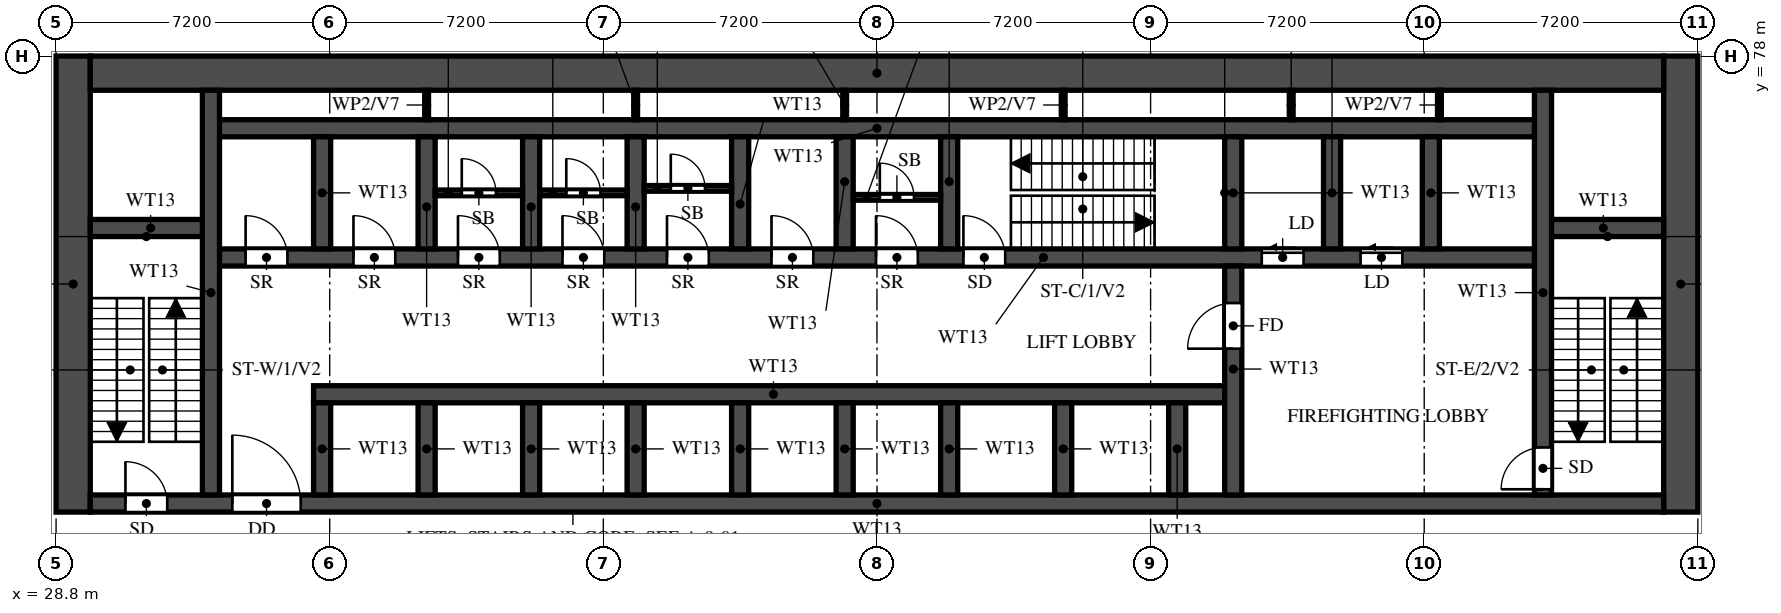
"""IFC4 building model, lengths in metres.
Left out: names, types, materials, properties, quantities, classifications, styles, units other than length and angle.
Written with IfcOpenShell. Run it as: python <this file> out.ifc"""

import sys

from ifc_helpers import new_model, si_unit, direction, frame, frame_2d, origin, place, context, subcontext, project, spatial, rectangle, extrude, element, fill, save


model = new_model("IFC4")
c1 = context("Model", 3, precision=1e-05, world=origin(), true_north=direction((0.0, 1.0)))
c2 = subcontext(c1, "Body", "Model", "MODEL_VIEW")
j1 = project(units=[si_unit("LENGTHUNIT", "METRE"), si_unit("PLANEANGLEUNIT", "RADIAN")], contexts=[c1])
p1 = place(None, origin())
s1 = spatial("IfcSite", under=j1, at=p1, CompositionType="ELEMENT")
p2 = place(p1, origin())
s2 = spatial("IfcBuilding", under=s1, at=p2, CompositionType="ELEMENT")
p3 = place(p2, frame((0.0, 0.0, -5.4)))
s3 = spatial("IfcBuildingStorey", under=s2, at=p3, CompositionType="ELEMENT", Elevation=-5.4)
for number, where, z_axis, x_axis in (
    (1, (29.25, 66.0, 0.0), (0.0, 0.0, 1.0), (0.0, 1.0, 0.0)),
    (2, (71.55, 66.0, 0.0), (0.0, 0.0, 1.0), (0.0, 1.0, 0.0)),
):
    element("IfcWall", number, at=place(p3, frame(where, z_axis=z_axis, x_axis=x_axis)), inside=s3, PredefinedType="SHEAR", context=c2, shape_type="SweptSolid", body=[
        extrude(rectangle(XDim=12.0, YDim=0.9, at=frame_2d((6.0, 0.0))), origin(), (0.0, 0.0, 1.0), 5.0),
    ])
p4 = place(p3, frame((29.7, 77.55, 0.0), z_axis=(0.0, 0.0, 1.0), x_axis=(1.0, 0.0, 0.0)))
e3 = element("IfcWall", 3, at=p4, inside=s3, PredefinedType="SHEAR", context=c2, shape_type="SweptSolid", body=[
    extrude(rectangle(XDim=41.4, YDim=0.9, at=frame_2d((20.7, 0.0))), origin(), (0.0, 0.0, 1.0), 5.0),
])
p5 = place(p3, frame((29.7, 66.225, 0.0), z_axis=(0.0, 0.0, 1.0), x_axis=(1.0, 0.0, 0.0)))
e4 = element("IfcWall", 4, at=p5, inside=s3, PredefinedType="SHEAR", context=c2, shape_type="SweptSolid", body=[
    extrude(rectangle(XDim=41.4, YDim=0.45, at=frame_2d((20.7, 0.0))), origin(), (0.0, 0.0, 1.0), 5.0),
])
p6 = place(p5, frame((0.925, 0.0, 0.0)))
e5 = element("IfcOpeningElement", 5, at=p6, cuts=e4, PredefinedType="OPENING", context=c2, shape_type="SweptSolid", body=[
    extrude(rectangle(XDim=1.1, YDim=2.1, at=frame_2d((0.55, 1.05))), frame((0.0, 0.235, 0.0), z_axis=(0.0, -1.0, 0.0), x_axis=(1.0, 0.0, 0.0)), (0.0, 0.0, 1.0), 0.47),
])
p7 = place(p5, frame((3.738, 0.0, 0.0)))
e6 = element("IfcOpeningElement", 6, at=p7, cuts=e4, PredefinedType="OPENING", context=c2, shape_type="SweptSolid", body=[
    extrude(rectangle(XDim=1.8, YDim=2.1, at=frame_2d((0.9, 1.05))), frame((0.0, 0.235, 0.0), z_axis=(0.0, -1.0, 0.0), x_axis=(1.0, 0.0, 0.0)), (0.0, 0.0, 1.0), 0.47),
])
p8 = place(p3, frame((35.575, 69.1, 0.0), z_axis=(0.0, 0.0, 1.0), x_axis=(1.0, 0.0, 0.0)))
e7 = element("IfcWall", 7, at=p8, inside=s3, PredefinedType="SHEAR", context=c2, shape_type="SweptSolid", body=[
    extrude(rectangle(XDim=24.2, YDim=0.45, at=frame_2d((12.1, 0.0))), origin(), (0.0, 0.0, 1.0), 5.0),
])
p9 = place(p3, frame((32.875, 72.7, 0.0), z_axis=(0.0, 0.0, 1.0), x_axis=(1.0, 0.0, 0.0)))
e8 = element("IfcWall", 8, at=p9, inside=s3, PredefinedType="SHEAR", context=c2, shape_type="SweptSolid", body=[
    extrude(rectangle(XDim=35.05, YDim=0.45, at=frame_2d((17.525, 0.0))), origin(), (0.0, 0.0, 1.0), 5.0),
])
p10 = place(p9, frame((19.8, 0.0, 0.0)))
e9 = element("IfcOpeningElement", 9, at=p10, cuts=e8, PredefinedType="OPENING", context=c2, shape_type="SweptSolid", body=[
    extrude(rectangle(XDim=1.1, YDim=2.1, at=frame_2d((0.55, 1.05))), frame((0.0, 0.235, 0.0), z_axis=(0.0, -1.0, 0.0), x_axis=(1.0, 0.0, 0.0)), (0.0, 0.0, 1.0), 0.47),
])
p11 = place(p9, frame((27.65, 0.0, 0.0)))
e10 = element("IfcOpeningElement", 10, at=p11, cuts=e8, PredefinedType="OPENING", context=c2, shape_type="SweptSolid", body=[
    extrude(rectangle(XDim=1.1, YDim=2.1, at=frame_2d((0.55, 1.05))), frame((0.0, 0.235, 0.0), z_axis=(0.0, -1.0, 0.0), x_axis=(1.0, 0.0, 0.0)), (0.0, 0.0, 1.0), 0.47),
])
p12 = place(p9, frame((30.25, 0.0, 0.0)))
e11 = element("IfcOpeningElement", 11, at=p12, cuts=e8, PredefinedType="OPENING", context=c2, shape_type="SweptSolid", body=[
    extrude(rectangle(XDim=1.1, YDim=2.1, at=frame_2d((0.55, 1.05))), frame((0.0, 0.235, 0.0), z_axis=(0.0, -1.0, 0.0), x_axis=(1.0, 0.0, 0.0)), (0.0, 0.0, 1.0), 0.47),
])
p13 = place(p9, frame((3.75, 0.0, 0.0)))
e12 = element("IfcOpeningElement", 12, at=p13, cuts=e8, PredefinedType="OPENING", context=c2, shape_type="SweptSolid", body=[
    extrude(rectangle(XDim=1.1, YDim=2.1, at=frame_2d((0.55, 1.05))), frame((0.0, 0.235, 0.0), z_axis=(0.0, -1.0, 0.0), x_axis=(1.0, 0.0, 0.0)), (0.0, 0.0, 1.0), 0.47),
])
p14 = place(p9, frame((6.5, 0.0, 0.0)))
e13 = element("IfcOpeningElement", 13, at=p14, cuts=e8, PredefinedType="OPENING", context=c2, shape_type="SweptSolid", body=[
    extrude(rectangle(XDim=1.1, YDim=2.1, at=frame_2d((0.55, 1.05))), frame((0.0, 0.235, 0.0), z_axis=(0.0, -1.0, 0.0), x_axis=(1.0, 0.0, 0.0)), (0.0, 0.0, 1.0), 0.47),
])
p15 = place(p9, frame((9.25, 0.0, 0.0)))
e14 = element("IfcOpeningElement", 14, at=p15, cuts=e8, PredefinedType="OPENING", context=c2, shape_type="SweptSolid", body=[
    extrude(rectangle(XDim=1.1, YDim=2.1, at=frame_2d((0.55, 1.05))), frame((0.0, 0.235, 0.0), z_axis=(0.0, -1.0, 0.0), x_axis=(1.0, 0.0, 0.0)), (0.0, 0.0, 1.0), 0.47),
])
p16 = place(p9, frame((12.0, 0.0, 0.0)))
e15 = element("IfcOpeningElement", 15, at=p16, cuts=e8, PredefinedType="OPENING", context=c2, shape_type="SweptSolid", body=[
    extrude(rectangle(XDim=1.1, YDim=2.1, at=frame_2d((0.55, 1.05))), frame((0.0, 0.235, 0.0), z_axis=(0.0, -1.0, 0.0), x_axis=(1.0, 0.0, 0.0)), (0.0, 0.0, 1.0), 0.47),
])
p17 = place(p9, frame((14.75, 0.0, 0.0)))
e16 = element("IfcOpeningElement", 16, at=p17, cuts=e8, PredefinedType="OPENING", context=c2, shape_type="SweptSolid", body=[
    extrude(rectangle(XDim=1.1, YDim=2.1, at=frame_2d((0.55, 1.05))), frame((0.0, 0.235, 0.0), z_axis=(0.0, -1.0, 0.0), x_axis=(1.0, 0.0, 0.0)), (0.0, 0.0, 1.0), 0.47),
])
p18 = place(p9, frame((17.5, 0.0, 0.0)))
e17 = element("IfcOpeningElement", 17, at=p18, cuts=e8, PredefinedType="OPENING", context=c2, shape_type="SweptSolid", body=[
    extrude(rectangle(XDim=1.1, YDim=2.1, at=frame_2d((0.55, 1.05))), frame((0.0, 0.235, 0.0), z_axis=(0.0, -1.0, 0.0), x_axis=(1.0, 0.0, 0.0)), (0.0, 0.0, 1.0), 0.47),
])
p19 = place(p9, frame((0.913, 0.0, 0.0)))
e18 = element("IfcOpeningElement", 18, at=p19, cuts=e8, PredefinedType="OPENING", context=c2, shape_type="SweptSolid", body=[
    extrude(rectangle(XDim=1.1, YDim=2.1, at=frame_2d((0.55, 1.05))), frame((0.0, 0.235, 0.0), z_axis=(0.0, -1.0, 0.0), x_axis=(1.0, 0.0, 0.0)), (0.0, 0.0, 1.0), 0.47),
])
p20 = place(p3, frame((32.875, 76.1, 0.0), z_axis=(0.0, 0.0, 1.0), x_axis=(1.0, 0.0, 0.0)))
e19 = element("IfcWall", 19, at=p20, inside=s3, PredefinedType="SHEAR", context=c2, shape_type="SweptSolid", body=[
    extrude(rectangle(XDim=35.05, YDim=0.45, at=frame_2d((17.525, 0.0))), origin(), (0.0, 0.0, 1.0), 5.0),
])
for number, where, z_axis, x_axis in (
    (20, (29.7, 73.475, 0.0), (0.0, 0.0, 1.0), (1.0, 0.0, 0.0)),
    (21, (67.925, 73.475, 0.0), (0.0, 0.0, 1.0), (1.0, 0.0, 0.0)),
):
    element("IfcWall", number, at=place(p3, frame(where, z_axis=z_axis, x_axis=x_axis)), inside=s3, PredefinedType="SHEAR", context=c2, shape_type="SweptSolid", body=[
        extrude(rectangle(XDim=3.175, YDim=0.45, at=frame_2d((1.587, 0.0))), origin(), (0.0, 0.0, 1.0), 5.0),
    ])
p21 = place(p3, frame((32.875, 66.45, 0.0), z_axis=(0.0, 0.0, 1.0), x_axis=(0.0, 1.0, 0.0)))
e22 = element("IfcWall", 22, at=p21, inside=s3, PredefinedType="SHEAR", context=c2, shape_type="SweptSolid", body=[
    extrude(rectangle(XDim=10.65, YDim=0.45, at=frame_2d((5.325, 0.0))), origin(), (0.0, 0.0, 1.0), 5.0),
])
p22 = place(p3, frame((67.925, 66.45, 0.0), z_axis=(0.0, 0.0, 1.0), x_axis=(0.0, 1.0, 0.0)))
e23 = element("IfcWall", 23, at=p22, inside=s3, PredefinedType="SHEAR", context=c2, shape_type="SweptSolid", body=[
    extrude(rectangle(XDim=10.65, YDim=0.45, at=frame_2d((5.325, 0.0))), origin(), (0.0, 0.0, 1.0), 5.0),
])
p23 = place(p22, frame((0.15, 0.0, 0.0)))
e24 = element("IfcOpeningElement", 24, at=p23, cuts=e23, PredefinedType="OPENING", context=c2, shape_type="SweptSolid", body=[
    extrude(rectangle(XDim=1.1, YDim=2.1, at=frame_2d((0.55, 1.05))), frame((0.0, 0.235, 0.0), z_axis=(0.0, -1.0, 0.0), x_axis=(1.0, 0.0, 0.0)), (0.0, 0.0, 1.0), 0.47),
])
p24 = place(p3, frame((59.775, 66.45, 0.0), z_axis=(0.0, 0.0, 1.0), x_axis=(0.0, 1.0, 0.0)))
e25 = element("IfcWall", 25, at=p24, inside=s3, PredefinedType="SHEAR", context=c2, shape_type="SweptSolid", body=[
    extrude(rectangle(XDim=6.025, YDim=0.45, at=frame_2d((3.013, 0.0))), origin(), (0.0, 0.0, 1.0), 5.0),
])
p25 = place(p24, frame((3.85, 0.0, 0.0)))
e26 = element("IfcOpeningElement", 26, at=p25, cuts=e25, PredefinedType="OPENING", context=c2, shape_type="SweptSolid", body=[
    extrude(rectangle(XDim=1.2, YDim=2.1, at=frame_2d((0.6, 1.05))), frame((0.0, 0.235, 0.0), z_axis=(0.0, -1.0, 0.0), x_axis=(1.0, 0.0, 0.0)), (0.0, 0.0, 1.0), 0.47),
])
p26 = place(p3, frame((59.775, 72.925, 0.0), z_axis=(0.0, 0.0, 1.0), x_axis=(0.0, 1.0, 0.0)))
e27 = element("IfcWall", 27, at=p26, inside=s3, PredefinedType="SHEAR", context=c2, shape_type="SweptSolid", body=[
    extrude(rectangle(XDim=2.95, YDim=0.45, at=frame_2d((1.475, 0.0))), origin(), (0.0, 0.0, 1.0), 5.0),
])
for number, where, z_axis, x_axis in (
    (28, (35.8, 66.45, 0.0), (0.0, 0.0, 1.0), (0.0, 1.0, 0.0)),
    (29, (38.55, 66.45, 0.0), (0.0, 0.0, 1.0), (0.0, 1.0, 0.0)),
    (30, (41.3, 66.45, 0.0), (0.0, 0.0, 1.0), (0.0, 1.0, 0.0)),
    (31, (44.05, 66.45, 0.0), (0.0, 0.0, 1.0), (0.0, 1.0, 0.0)),
    (32, (46.8, 66.45, 0.0), (0.0, 0.0, 1.0), (0.0, 1.0, 0.0)),
    (33, (49.55, 66.45, 0.0), (0.0, 0.0, 1.0), (0.0, 1.0, 0.0)),
    (34, (52.3, 66.45, 0.0), (0.0, 0.0, 1.0), (0.0, 1.0, 0.0)),
    (35, (55.3, 66.45, 0.0), (0.0, 0.0, 1.0), (0.0, 1.0, 0.0)),
    (36, (58.3, 66.45, 0.0), (0.0, 0.0, 1.0), (0.0, 1.0, 0.0)),
):
    element("IfcWall", number, at=place(p3, frame(where, z_axis=z_axis, x_axis=x_axis)), inside=s3, PredefinedType="SHEAR", context=c2, shape_type="SweptSolid", body=[
        extrude(rectangle(XDim=2.425, YDim=0.45, at=frame_2d((1.212, 0.0))), origin(), (0.0, 0.0, 1.0), 5.0),
    ])
for number, where, z_axis, x_axis in (
    (37, (35.8, 72.925, 0.0), (0.0, 0.0, 1.0), (0.0, 1.0, 0.0)),
    (38, (38.55, 72.925, 0.0), (0.0, 0.0, 1.0), (0.0, 1.0, 0.0)),
    (39, (41.3, 72.925, 0.0), (0.0, 0.0, 1.0), (0.0, 1.0, 0.0)),
    (40, (44.05, 72.925, 0.0), (0.0, 0.0, 1.0), (0.0, 1.0, 0.0)),
    (41, (46.8, 72.925, 0.0), (0.0, 0.0, 1.0), (0.0, 1.0, 0.0)),
    (42, (49.55, 72.925, 0.0), (0.0, 0.0, 1.0), (0.0, 1.0, 0.0)),
    (43, (52.3, 72.925, 0.0), (0.0, 0.0, 1.0), (0.0, 1.0, 0.0)),
    (44, (62.375, 72.925, 0.0), (0.0, 0.0, 1.0), (0.0, 1.0, 0.0)),
    (45, (64.975, 72.925, 0.0), (0.0, 0.0, 1.0), (0.0, 1.0, 0.0)),
):
    element("IfcWall", number, at=place(p3, frame(where, z_axis=z_axis, x_axis=x_axis)), inside=s3, PredefinedType="SHEAR", context=c2, shape_type="SweptSolid", body=[
        extrude(rectangle(XDim=2.95, YDim=0.45, at=frame_2d((1.475, 0.0))), origin(), (0.0, 0.0, 1.0), 5.0),
    ])
p27 = place(p3, frame((38.775, 74.4, 0.0), z_axis=(0.0, 0.0, 1.0), x_axis=(1.0, 0.0, 0.0)))
e46 = element("IfcWall", 46, at=p27, inside=s3, PredefinedType="PARTITIONING", context=c2, shape_type="SweptSolid", body=[
    extrude(rectangle(XDim=2.3, YDim=0.15, at=frame_2d((1.15, 0.0))), origin(), (0.0, 0.0, 1.0), 5.0),
])
p28 = place(p27, frame((0.7, 0.0, 0.0)))
e47 = element("IfcOpeningElement", 47, at=p28, cuts=e46, PredefinedType="OPENING", context=c2, shape_type="SweptSolid", body=[
    extrude(rectangle(XDim=0.9, YDim=2.1, at=frame_2d((0.45, 1.05))), frame((0.0, 0.085, 0.0), z_axis=(0.0, -1.0, 0.0), x_axis=(1.0, 0.0, 0.0)), (0.0, 0.0, 1.0), 0.17),
])
p29 = place(p3, frame((41.525, 74.4, 0.0), z_axis=(0.0, 0.0, 1.0), x_axis=(1.0, 0.0, 0.0)))
e48 = element("IfcWall", 48, at=p29, inside=s3, PredefinedType="PARTITIONING", context=c2, shape_type="SweptSolid", body=[
    extrude(rectangle(XDim=2.3, YDim=0.15, at=frame_2d((1.15, 0.0))), origin(), (0.0, 0.0, 1.0), 5.0),
])
p30 = place(p29, frame((0.7, 0.0, 0.0)))
e49 = element("IfcOpeningElement", 49, at=p30, cuts=e48, PredefinedType="OPENING", context=c2, shape_type="SweptSolid", body=[
    extrude(rectangle(XDim=0.9, YDim=2.1, at=frame_2d((0.45, 1.05))), frame((0.0, 0.085, 0.0), z_axis=(0.0, -1.0, 0.0), x_axis=(1.0, 0.0, 0.0)), (0.0, 0.0, 1.0), 0.17),
])
p31 = place(p3, frame((44.275, 74.518, 0.0), z_axis=(0.0, 0.0, 1.0), x_axis=(1.0, 0.0, 0.0)))
e50 = element("IfcWall", 50, at=p31, inside=s3, PredefinedType="PARTITIONING", context=c2, shape_type="SweptSolid", body=[
    extrude(rectangle(XDim=2.3, YDim=0.15, at=frame_2d((1.15, 0.0))), origin(), (0.0, 0.0, 1.0), 5.0),
])
p32 = place(p31, frame((0.7, 0.0, 0.0)))
e51 = element("IfcOpeningElement", 51, at=p32, cuts=e50, PredefinedType="OPENING", context=c2, shape_type="SweptSolid", body=[
    extrude(rectangle(XDim=0.9, YDim=2.1, at=frame_2d((0.45, 1.05))), frame((0.0, 0.085, 0.0), z_axis=(0.0, -1.0, 0.0), x_axis=(1.0, 0.0, 0.0)), (0.0, 0.0, 1.0), 0.17),
])
p33 = place(p3, frame((49.775, 74.282, 0.0), z_axis=(0.0, 0.0, 1.0), x_axis=(1.0, 0.0, 0.0)))
e52 = element("IfcWall", 52, at=p33, inside=s3, PredefinedType="PARTITIONING", context=c2, shape_type="SweptSolid", body=[
    extrude(rectangle(XDim=2.3, YDim=0.15, at=frame_2d((1.15, 0.0))), origin(), (0.0, 0.0, 1.0), 5.0),
])
p34 = place(p33, frame((0.7, 0.0, 0.0)))
e53 = element("IfcOpeningElement", 53, at=p34, cuts=e52, PredefinedType="OPENING", context=c2, shape_type="SweptSolid", body=[
    extrude(rectangle(XDim=0.9, YDim=2.1, at=frame_2d((0.45, 1.05))), frame((0.0, 0.085, 0.0), z_axis=(0.0, -1.0, 0.0), x_axis=(1.0, 0.0, 0.0)), (0.0, 0.0, 1.0), 0.17),
])
for number, where, z_axis, x_axis in (
    (54, (38.55, 76.325, 0.0), (0.0, 0.0, 1.0), (0.0, 1.0, 0.0)),
    (55, (44.05, 76.325, 0.0), (0.0, 0.0, 1.0), (0.0, 1.0, 0.0)),
    (56, (49.55, 76.325, 0.0), (0.0, 0.0, 1.0), (0.0, 1.0, 0.0)),
    (57, (55.3, 76.325, 0.0), (0.0, 0.0, 1.0), (0.0, 1.0, 0.0)),
    (58, (61.3, 76.325, 0.0), (0.0, 0.0, 1.0), (0.0, 1.0, 0.0)),
    (59, (65.2, 76.325, 0.0), (0.0, 0.0, 1.0), (0.0, 1.0, 0.0)),
):
    element("IfcWall", number, at=place(p3, frame(where, z_axis=z_axis, x_axis=x_axis)), inside=s3, PredefinedType="PARTITIONING", context=c2, shape_type="SweptSolid", body=[
        extrude(rectangle(XDim=0.775, YDim=0.1, at=frame_2d((0.388, 0.0))), origin(), (0.0, 0.0, 1.0), 5.0),
    ])
p35 = place(p6, origin())
e60 = element("IfcDoor", 60, at=p35, inside=s3, OperationType="SINGLE_SWING_LEFT", PredefinedType="DOOR", context=c2, shape_type="SweptSolid", body=[
    extrude(rectangle(XDim=1.1, YDim=2.1, at=frame_2d((0.55, 1.05))), frame((0.0, 0.025, 0.0), z_axis=(0.0, -1.0, 0.0), x_axis=(1.0, 0.0, 0.0)), (0.0, 0.0, 1.0), 0.05),
])
fill(e5, e60)
p36 = place(p10, origin())
e61 = element("IfcDoor", 61, at=p36, inside=s3, OperationType="SINGLE_SWING_LEFT", PredefinedType="DOOR", context=c2, shape_type="SweptSolid", body=[
    extrude(rectangle(XDim=1.1, YDim=2.1, at=frame_2d((0.55, 1.05))), frame((0.0, 0.025, 0.0), z_axis=(0.0, -1.0, 0.0), x_axis=(1.0, 0.0, 0.0)), (0.0, 0.0, 1.0), 0.05),
])
fill(e9, e61)
p37 = place(p23, origin())
e62 = element("IfcDoor", 62, at=p37, inside=s3, OperationType="SINGLE_SWING_LEFT", PredefinedType="DOOR", context=c2, shape_type="SweptSolid", body=[
    extrude(rectangle(XDim=1.1, YDim=2.1, at=frame_2d((0.55, 1.05))), frame((0.0, 0.025, 0.0), z_axis=(0.0, -1.0, 0.0), x_axis=(1.0, 0.0, 0.0)), (0.0, 0.0, 1.0), 0.05),
])
fill(e24, e62)
p38 = place(p7, origin())
e63 = element("IfcDoor", 63, at=p38, inside=s3, OperationType="DOUBLE_DOOR_SINGLE_SWING", PredefinedType="DOOR", context=c2, shape_type="SweptSolid", body=[
    extrude(rectangle(XDim=1.8, YDim=2.1, at=frame_2d((0.9, 1.05))), frame((0.0, 0.025, 0.0), z_axis=(0.0, -1.0, 0.0), x_axis=(1.0, 0.0, 0.0)), (0.0, 0.0, 1.0), 0.05),
])
fill(e6, e63)
p39 = place(p25, origin())
e64 = element("IfcDoor", 64, at=p39, inside=s3, OperationType="SINGLE_SWING_RIGHT", PredefinedType="DOOR", context=c2, shape_type="SweptSolid", body=[
    extrude(rectangle(XDim=1.2, YDim=2.1, at=frame_2d((0.6, 1.05))), frame((0.0, 0.025, 0.0), z_axis=(0.0, -1.0, 0.0), x_axis=(1.0, 0.0, 0.0)), (0.0, 0.0, 1.0), 0.05),
])
fill(e26, e64)
p40 = place(p11, origin())
e65 = element("IfcDoor", 65, at=p40, inside=s3, OperationType="SLIDING_TO_LEFT", PredefinedType="DOOR", context=c2, shape_type="SweptSolid", body=[
    extrude(rectangle(XDim=1.1, YDim=2.1, at=frame_2d((0.55, 1.05))), frame((0.0, 0.025, 0.0), z_axis=(0.0, -1.0, 0.0), x_axis=(1.0, 0.0, 0.0)), (0.0, 0.0, 1.0), 0.05),
])
fill(e10, e65)
p41 = place(p12, origin())
e66 = element("IfcDoor", 66, at=p41, inside=s3, OperationType="SLIDING_TO_LEFT", PredefinedType="DOOR", context=c2, shape_type="SweptSolid", body=[
    extrude(rectangle(XDim=1.1, YDim=2.1, at=frame_2d((0.55, 1.05))), frame((0.0, 0.025, 0.0), z_axis=(0.0, -1.0, 0.0), x_axis=(1.0, 0.0, 0.0)), (0.0, 0.0, 1.0), 0.05),
])
fill(e11, e66)
p42 = place(p13, origin())
e67 = element("IfcDoor", 67, at=p42, inside=s3, OperationType="SINGLE_SWING_LEFT", PredefinedType="DOOR", context=c2, shape_type="SweptSolid", body=[
    extrude(rectangle(XDim=1.1, YDim=2.1, at=frame_2d((0.55, 1.05))), frame((0.0, 0.025, 0.0), z_axis=(0.0, -1.0, 0.0), x_axis=(1.0, 0.0, 0.0)), (0.0, 0.0, 1.0), 0.05),
])
fill(e12, e67)
p43 = place(p14, origin())
e68 = element("IfcDoor", 68, at=p43, inside=s3, OperationType="SINGLE_SWING_LEFT", PredefinedType="DOOR", context=c2, shape_type="SweptSolid", body=[
    extrude(rectangle(XDim=1.1, YDim=2.1, at=frame_2d((0.55, 1.05))), frame((0.0, 0.025, 0.0), z_axis=(0.0, -1.0, 0.0), x_axis=(1.0, 0.0, 0.0)), (0.0, 0.0, 1.0), 0.05),
])
fill(e13, e68)
p44 = place(p28, origin())
e69 = element("IfcDoor", 69, at=p44, inside=s3, OperationType="SINGLE_SWING_RIGHT", PredefinedType="DOOR", context=c2, shape_type="SweptSolid", body=[
    extrude(rectangle(XDim=0.9, YDim=2.1, at=frame_2d((0.45, 1.05))), frame((0.0, 0.025, 0.0), z_axis=(0.0, -1.0, 0.0), x_axis=(1.0, 0.0, 0.0)), (0.0, 0.0, 1.0), 0.05),
])
fill(e47, e69)
p45 = place(p15, origin())
e70 = element("IfcDoor", 70, at=p45, inside=s3, OperationType="SINGLE_SWING_LEFT", PredefinedType="DOOR", context=c2, shape_type="SweptSolid", body=[
    extrude(rectangle(XDim=1.1, YDim=2.1, at=frame_2d((0.55, 1.05))), frame((0.0, 0.025, 0.0), z_axis=(0.0, -1.0, 0.0), x_axis=(1.0, 0.0, 0.0)), (0.0, 0.0, 1.0), 0.05),
])
fill(e14, e70)
p46 = place(p30, origin())
e71 = element("IfcDoor", 71, at=p46, inside=s3, OperationType="SINGLE_SWING_LEFT", PredefinedType="DOOR", context=c2, shape_type="SweptSolid", body=[
    extrude(rectangle(XDim=0.9, YDim=2.1, at=frame_2d((0.45, 1.05))), frame((0.0, 0.025, 0.0), z_axis=(0.0, -1.0, 0.0), x_axis=(1.0, 0.0, 0.0)), (0.0, 0.0, 1.0), 0.05),
])
fill(e49, e71)
p47 = place(p16, origin())
e72 = element("IfcDoor", 72, at=p47, inside=s3, OperationType="SINGLE_SWING_LEFT", PredefinedType="DOOR", context=c2, shape_type="SweptSolid", body=[
    extrude(rectangle(XDim=1.1, YDim=2.1, at=frame_2d((0.55, 1.05))), frame((0.0, 0.025, 0.0), z_axis=(0.0, -1.0, 0.0), x_axis=(1.0, 0.0, 0.0)), (0.0, 0.0, 1.0), 0.05),
])
fill(e15, e72)
p48 = place(p32, origin())
e73 = element("IfcDoor", 73, at=p48, inside=s3, OperationType="SINGLE_SWING_LEFT", PredefinedType="DOOR", context=c2, shape_type="SweptSolid", body=[
    extrude(rectangle(XDim=0.9, YDim=2.1, at=frame_2d((0.45, 1.05))), frame((0.0, 0.025, 0.0), z_axis=(0.0, -1.0, 0.0), x_axis=(1.0, 0.0, 0.0)), (0.0, 0.0, 1.0), 0.05),
])
fill(e51, e73)
p49 = place(p17, origin())
e74 = element("IfcDoor", 74, at=p49, inside=s3, OperationType="SINGLE_SWING_LEFT", PredefinedType="DOOR", context=c2, shape_type="SweptSolid", body=[
    extrude(rectangle(XDim=1.1, YDim=2.1, at=frame_2d((0.55, 1.05))), frame((0.0, 0.025, 0.0), z_axis=(0.0, -1.0, 0.0), x_axis=(1.0, 0.0, 0.0)), (0.0, 0.0, 1.0), 0.05),
])
fill(e16, e74)
p50 = place(p18, origin())
e75 = element("IfcDoor", 75, at=p50, inside=s3, OperationType="SINGLE_SWING_LEFT", PredefinedType="DOOR", context=c2, shape_type="SweptSolid", body=[
    extrude(rectangle(XDim=1.1, YDim=2.1, at=frame_2d((0.55, 1.05))), frame((0.0, 0.025, 0.0), z_axis=(0.0, -1.0, 0.0), x_axis=(1.0, 0.0, 0.0)), (0.0, 0.0, 1.0), 0.05),
])
fill(e17, e75)
p51 = place(p34, origin())
e76 = element("IfcDoor", 76, at=p51, inside=s3, OperationType="SINGLE_SWING_RIGHT", PredefinedType="DOOR", context=c2, shape_type="SweptSolid", body=[
    extrude(rectangle(XDim=0.9, YDim=2.1, at=frame_2d((0.45, 1.05))), frame((0.0, 0.025, 0.0), z_axis=(0.0, -1.0, 0.0), x_axis=(1.0, 0.0, 0.0)), (0.0, 0.0, 1.0), 0.05),
])
fill(e53, e76)
p52 = place(p19, origin())
e77 = element("IfcDoor", 77, at=p52, inside=s3, OperationType="SINGLE_SWING_LEFT", PredefinedType="DOOR", context=c2, shape_type="SweptSolid", body=[
    extrude(rectangle(XDim=1.1, YDim=2.1, at=frame_2d((0.55, 1.05))), frame((0.0, 0.025, 0.0), z_axis=(0.0, -1.0, 0.0), x_axis=(1.0, 0.0, 0.0)), (0.0, 0.0, 1.0), 0.05),
])
fill(e18, e77)
save(model, sys.argv[1])
